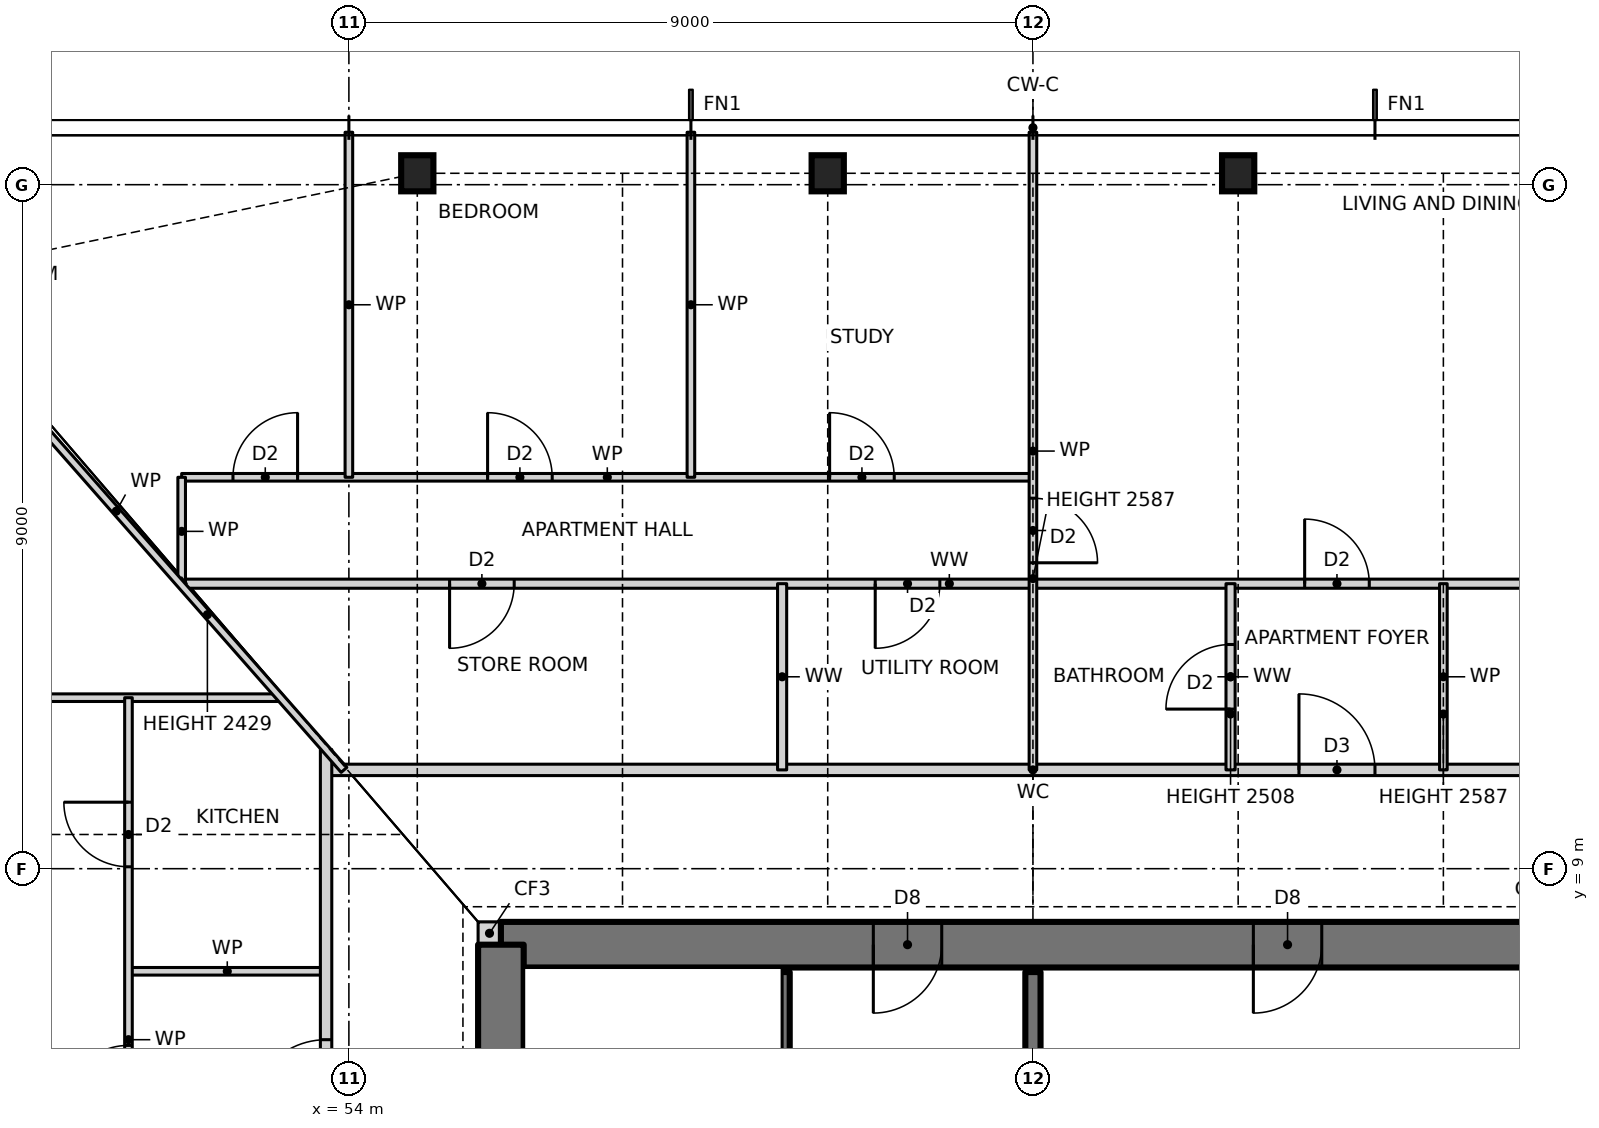
"""IFC4 building model, lengths in metres.
Left out: names, types, materials, properties, quantities, classifications, styles, units other than length and angle.
Written with IfcOpenShell. Run it as: python <this file> out.ifc"""

import sys

from ifc_helpers import new_model, si_unit, direction, frame, frame_2d, origin, origin_2d, place, context, subcontext, project, spatial, rectangle, i_section, extrude, element, fill, save


model = new_model("IFC4")
c1 = context("Model", 3, precision=1e-05, world=origin(), true_north=direction((0.0, 1.0)))
c2 = subcontext(c1, "Body", "Model", "MODEL_VIEW")
j1 = project(units=[si_unit("LENGTHUNIT", "METRE"), si_unit("PLANEANGLEUNIT", "RADIAN")], contexts=[c1])
p1 = place(None, origin())
s1 = spatial("IfcSite", under=j1, at=p1, CompositionType="ELEMENT")
p2 = place(p1, origin())
s2 = spatial("IfcBuilding", under=s1, at=p2, CompositionType="ELEMENT")
p3 = place(p2, frame((0.0, 0.0, 60.5)))
s3 = spatial("IfcBuildingStorey", under=s2, at=p3, CompositionType="ELEMENT", Elevation=60.5)
for number, where, z_axis, x_axis in (
    (1, (65.7, 18.15, 0.0), (0.0, 0.0, 1.0), (1.0, 0.0, 0.0)),
    (2, (60.3, 18.15, 0.0), (0.0, 0.0, 1.0), (1.0, 0.0, 0.0)),
    (3, (54.9, 18.15, 0.0), (0.0, 0.0, 1.0), (1.0, 0.0, 0.0)),
):
    element("IfcColumn", number, at=place(p3, frame(where, z_axis=z_axis, x_axis=x_axis)), inside=s3, PredefinedType="COLUMN", context=c2, shape_type="SweptSolid", body=[
        extrude(i_section(OverallWidth=0.424, OverallDepth=0.475, WebThickness=0.048, FlangeThickness=0.077, at=origin_2d()), origin(), (0.0, 0.0, 1.0), 3.5),
    ])
p4 = place(p3, frame((55.7, 8.15, 0.0), z_axis=(0.0, 0.0, 1.0), x_axis=(1.0, 0.0, 0.0)))
e4 = element("IfcWall", 4, at=p4, inside=s3, PredefinedType="SOLIDWALL", context=c2, shape_type="SweptSolid", body=[
    extrude(rectangle(XDim=0.3, YDim=0.3, at=frame_2d((0.15, 0.0))), origin(), (0.0, 0.0, 1.0), 3.5),
])
p5 = place(p3, frame((70.0, 8.0, 0.0), z_axis=(0.0, 0.0, 1.0), x_axis=(-1.0, 0.0, 0.0)))
e5 = element("IfcWall", 5, at=p5, inside=s3, PredefinedType="SHEAR", context=c2, shape_type="SweptSolid", body=[
    extrude(rectangle(XDim=14.0, YDim=0.6, at=frame_2d((7.0, 0.0))), origin(), (0.0, 0.0, 1.0), 3.5),
])
p6 = place(p5, frame((8.2, 0.0, 0.0)))
e6 = element("IfcOpeningElement", 6, at=p6, cuts=e5, PredefinedType="OPENING", context=c2, shape_type="SweptSolid", body=[
    extrude(rectangle(XDim=0.9, YDim=2.1, at=frame_2d((0.45, 1.05))), frame((0.0, 0.31, 0.0), z_axis=(0.0, -1.0, 0.0), x_axis=(1.0, 0.0, 0.0)), (0.0, 0.0, 1.0), 0.62),
])
p7 = place(p5, frame((3.2, 0.0, 0.0)))
e7 = element("IfcOpeningElement", 7, at=p7, cuts=e5, PredefinedType="OPENING", context=c2, shape_type="SweptSolid", body=[
    extrude(rectangle(XDim=0.9, YDim=2.1, at=frame_2d((0.45, 1.05))), frame((0.0, 0.31, 0.0), z_axis=(0.0, -1.0, 0.0), x_axis=(1.0, 0.0, 0.0)), (0.0, 0.0, 1.0), 0.62),
])
p8 = place(p3, frame((56.0, 8.0, 0.0), z_axis=(0.0, 0.0, 1.0), x_axis=(0.0, -1.0, 0.0)))
e8 = element("IfcWall", 8, at=p8, inside=s3, PredefinedType="SHEAR", context=c2, shape_type="SweptSolid", body=[
    extrude(rectangle(XDim=16.0, YDim=0.6, at=frame_2d((8.0, 0.0))), origin(), (0.0, 0.0, 1.0), 3.5),
])
p9 = place(p8, frame((7.5, 0.0, 0.0)))
e9 = element("IfcOpeningElement", 9, at=p9, cuts=e8, PredefinedType="OPENING", context=c2, shape_type="SweptSolid", body=[
    extrude(rectangle(XDim=1.0, YDim=2.1, at=frame_2d((0.5, 1.05))), frame((0.0, 0.31, 0.0), z_axis=(0.0, -1.0, 0.0), x_axis=(1.0, 0.0, 0.0)), (0.0, 0.0, 1.0), 0.62),
])
p10 = place(p3, frame((51.1, 7.65, 0.0), z_axis=(0.0, 0.0, 1.0), x_axis=(1.0, 0.0, 0.0)))
e10 = element("IfcWall", 10, at=p10, inside=s3, PredefinedType="PARTITIONING", context=c2, shape_type="SweptSolid", body=[
    extrude(rectangle(XDim=2.6, YDim=0.1, at=frame_2d((1.3, 0.0))), origin(), (0.0, 0.0, 1.0), 3.27),
])
p11 = place(p3, frame((53.7, 10.3, 0.0), z_axis=(0.0, 0.0, 1.0), x_axis=(1.0, 0.0, 0.0)))
e11 = element("IfcWall", 11, at=p11, inside=s3, PredefinedType="PARTITIONING", context=c2, shape_type="SweptSolid", body=[
    extrude(rectangle(XDim=18.6, YDim=0.15, at=frame_2d((9.3, 0.0))), origin(), (0.0, 0.0, 1.0), 3.27),
])
p12 = place(p11, frame((12.8, 0.0, 0.0)))
e12 = element("IfcOpeningElement", 12, at=p12, cuts=e11, PredefinedType="OPENING", context=c2, shape_type="SweptSolid", body=[
    extrude(rectangle(XDim=1.0, YDim=2.1, at=frame_2d((0.5, 1.05))), frame((0.0, 0.085, 0.0), z_axis=(0.0, -1.0, 0.0), x_axis=(1.0, 0.0, 0.0)), (0.0, 0.0, 1.0), 0.17),
])
p13 = place(p3, frame((46.56, 11.25, 0.0), z_axis=(0.0, 0.0, 1.0), x_axis=(1.0, 0.0, 0.0)))
e13 = element("IfcWall", 13, at=p13, inside=s3, PredefinedType="PARTITIONING", context=c2, shape_type="SweptSolid", body=[
    extrude(rectangle(XDim=6.54, YDim=0.1, at=frame_2d((3.27, 0.0))), origin(), (0.0, 0.0, 1.0), 3.27),
])
p14 = place(p13, frame((1.845, 0.0, 0.0)))
e14 = element("IfcOpeningElement", 14, at=p14, cuts=e13, PredefinedType="OPENING", context=c2, shape_type="SweptSolid", body=[
    extrude(rectangle(XDim=0.85, YDim=2.1, at=frame_2d((0.425, 1.05))), frame((0.0, 0.06, 0.0), z_axis=(0.0, -1.0, 0.0), x_axis=(1.0, 0.0, 0.0)), (0.0, 0.0, 1.0), 0.12),
])
p15 = place(p3, frame((51.8, 12.75, 0.0), z_axis=(0.0, 0.0, 1.0), x_axis=(1.0, 0.0, 0.0)))
e15 = element("IfcWall", 15, at=p15, inside=s3, PredefinedType="PARTITIONING", context=c2, shape_type="SweptSolid", body=[
    extrude(rectangle(XDim=20.2, YDim=0.12, at=frame_2d((10.1, 0.0))), origin(), (0.0, 0.0, 1.0), 3.27),
])
p16 = place(p15, frame((17.975, 0.0, 0.0)))
e16 = element("IfcOpeningElement", 16, at=p16, cuts=e15, PredefinedType="OPENING", context=c2, shape_type="SweptSolid", body=[
    extrude(rectangle(XDim=0.85, YDim=2.1, at=frame_2d((0.425, 1.05))), frame((0.0, 0.07, 0.0), z_axis=(0.0, -1.0, 0.0), x_axis=(1.0, 0.0, 0.0)), (0.0, 0.0, 1.0), 0.14),
])
p17 = place(p15, frame((14.775, 0.0, 0.0)))
e17 = element("IfcOpeningElement", 17, at=p17, cuts=e15, PredefinedType="OPENING", context=c2, shape_type="SweptSolid", body=[
    extrude(rectangle(XDim=0.85, YDim=2.1, at=frame_2d((0.425, 1.05))), frame((0.0, 0.07, 0.0), z_axis=(0.0, -1.0, 0.0), x_axis=(1.0, 0.0, 0.0)), (0.0, 0.0, 1.0), 0.14),
])
p18 = place(p15, frame((9.125, 0.0, 0.0)))
e18 = element("IfcOpeningElement", 18, at=p18, cuts=e15, PredefinedType="OPENING", context=c2, shape_type="SweptSolid", body=[
    extrude(rectangle(XDim=0.85, YDim=2.1, at=frame_2d((0.425, 1.05))), frame((0.0, 0.07, 0.0), z_axis=(0.0, -1.0, 0.0), x_axis=(1.0, 0.0, 0.0)), (0.0, 0.0, 1.0), 0.14),
])
p19 = place(p15, frame((3.525, 0.0, 0.0)))
e19 = element("IfcOpeningElement", 19, at=p19, cuts=e15, PredefinedType="OPENING", context=c2, shape_type="SweptSolid", body=[
    extrude(rectangle(XDim=0.85, YDim=2.1, at=frame_2d((0.425, 1.05))), frame((0.0, 0.07, 0.0), z_axis=(0.0, -1.0, 0.0), x_axis=(1.0, 0.0, 0.0)), (0.0, 0.0, 1.0), 0.14),
])
p20 = place(p3, frame((51.8, 14.15, 0.0), z_axis=(0.0, 0.0, 1.0), x_axis=(1.0, 0.0, 0.0)))
e20 = element("IfcWall", 20, at=p20, inside=s3, PredefinedType="PARTITIONING", context=c2, shape_type="SweptSolid", body=[
    extrude(rectangle(XDim=11.2, YDim=0.1, at=frame_2d((5.6, 0.0))), origin(), (0.0, 0.0, 1.0), 3.27),
])
p21 = place(p20, frame((8.525, 0.0, 0.0)))
e21 = element("IfcOpeningElement", 21, at=p21, cuts=e20, PredefinedType="OPENING", context=c2, shape_type="SweptSolid", body=[
    extrude(rectangle(XDim=0.85, YDim=2.1, at=frame_2d((0.425, 1.05))), frame((0.0, 0.06, 0.0), z_axis=(0.0, -1.0, 0.0), x_axis=(1.0, 0.0, 0.0)), (0.0, 0.0, 1.0), 0.12),
])
p22 = place(p20, frame((4.025, 0.0, 0.0)))
e22 = element("IfcOpeningElement", 22, at=p22, cuts=e20, PredefinedType="OPENING", context=c2, shape_type="SweptSolid", body=[
    extrude(rectangle(XDim=0.85, YDim=2.1, at=frame_2d((0.425, 1.05))), frame((0.0, 0.06, 0.0), z_axis=(0.0, -1.0, 0.0), x_axis=(1.0, 0.0, 0.0)), (0.0, 0.0, 1.0), 0.12),
])
p23 = place(p20, frame((0.675, 0.0, 0.0)))
e23 = element("IfcOpeningElement", 23, at=p23, cuts=e20, PredefinedType="OPENING", context=c2, shape_type="SweptSolid", body=[
    extrude(rectangle(XDim=0.85, YDim=2.1, at=frame_2d((0.425, 1.05))), frame((0.0, 0.06, 0.0), z_axis=(0.0, -1.0, 0.0), x_axis=(1.0, 0.0, 0.0)), (0.0, 0.0, 1.0), 0.12),
])
p24 = place(p3, frame((68.4, 10.3, 0.0), z_axis=(0.0, 0.0, 1.0), x_axis=(0.0, 1.0, 0.0)))
e24 = element("IfcWall", 24, at=p24, inside=s3, PredefinedType="PARTITIONING", context=c2, shape_type="SweptSolid", body=[
    extrude(rectangle(XDim=2.45, YDim=0.1, at=frame_2d((1.225, 0.0))), origin(), (0.0, 0.0, 1.0), 2.587),
])
p25 = place(p3, frame((65.6, 10.3, 0.0), z_axis=(0.0, 0.0, 1.0), x_axis=(0.0, 1.0, 0.0)))
e25 = element("IfcWall", 25, at=p25, inside=s3, PredefinedType="PARTITIONING", context=c2, shape_type="SweptSolid", body=[
    extrude(rectangle(XDim=2.45, YDim=0.12, at=frame_2d((1.225, 0.0))), origin(), (0.0, 0.0, 1.0), 2.508),
])
p26 = place(p25, frame((0.8, 0.0, 0.0)))
e26 = element("IfcOpeningElement", 26, at=p26, cuts=e25, PredefinedType="OPENING", context=c2, shape_type="SweptSolid", body=[
    extrude(rectangle(XDim=0.85, YDim=2.1, at=frame_2d((0.425, 1.05))), frame((0.0, 0.07, 0.0), z_axis=(0.0, -1.0, 0.0), x_axis=(1.0, 0.0, 0.0)), (0.0, 0.0, 1.0), 0.14),
])
p27 = place(p3, frame((63.0, 3.85, 0.0), z_axis=(0.0, 0.0, 1.0), x_axis=(0.0, 1.0, 0.0)))
e27 = element("IfcWall", 27, at=p27, inside=s3, PredefinedType="SOLIDWALL", context=c2, shape_type="SweptSolid", body=[
    extrude(rectangle(XDim=3.79, YDim=0.2, at=frame_2d((1.895, 0.0))), origin(), (0.0, 0.0, 1.0), 3.5),
])
p28 = place(p3, frame((63.0, 10.3, 0.0), z_axis=(0.0, 0.0, 1.0), x_axis=(0.0, 1.0, 0.0)))
e28 = element("IfcWall", 28, at=p28, inside=s3, PredefinedType="PARTITIONING", context=c2, shape_type="SweptSolid", body=[
    extrude(rectangle(XDim=8.39, YDim=0.1, at=frame_2d((4.195, 0.0))), origin(), (0.0, 0.0, 1.0), 2.587),
])
p29 = place(p28, frame((2.725, 0.0, 0.0)))
e29 = element("IfcOpeningElement", 29, at=p29, cuts=e28, PredefinedType="OPENING", context=c2, shape_type="SweptSolid", body=[
    extrude(rectangle(XDim=0.85, YDim=2.1, at=frame_2d((0.425, 1.05))), frame((0.0, 0.06, 0.0), z_axis=(0.0, -1.0, 0.0), x_axis=(1.0, 0.0, 0.0)), (0.0, 0.0, 1.0), 0.12),
])
p30 = place(p3, frame((59.7, 1.05, 0.0), z_axis=(0.0, 0.0, 1.0), x_axis=(0.0, 1.0, 0.0)))
e30 = element("IfcWall", 30, at=p30, inside=s3, PredefinedType="SOLIDWALL", context=c2, shape_type="SweptSolid", body=[
    extrude(rectangle(XDim=6.59, YDim=0.2, at=frame_2d((3.295, 0.0))), origin(), (0.0, 0.0, 1.0), 3.5),
])
p31 = place(p3, frame((59.7, 10.3, 0.0), z_axis=(0.0, 0.0, 1.0), x_axis=(0.0, 1.0, 0.0)))
e31 = element("IfcWall", 31, at=p31, inside=s3, PredefinedType="PARTITIONING", context=c2, shape_type="SweptSolid", body=[
    extrude(rectangle(XDim=2.45, YDim=0.12, at=frame_2d((1.225, 0.0))), origin(), (0.0, 0.0, 1.0), 3.27),
])
for number, where, z_axis, x_axis in (
    (32, (58.5, 14.15, 0.0), (0.0, 0.0, 1.0), (0.0, 1.0, 0.0)),
    (33, (54.0, 14.15, 0.0), (0.0, 0.0, 1.0), (0.0, 1.0, 0.0)),
):
    element("IfcWall", number, at=place(p3, frame(where, z_axis=z_axis, x_axis=x_axis)), inside=s3, PredefinedType="PARTITIONING", context=c2, shape_type="SweptSolid", body=[
        extrude(rectangle(XDim=4.54, YDim=0.1, at=frame_2d((2.27, 0.0))), origin(), (0.0, 0.0, 1.0), 3.27),
    ])
p32 = place(p3, frame((53.7, -10.9, 0.0), z_axis=(0.0, 0.0, 1.0), x_axis=(0.0, 1.0, 0.0)))
e34 = element("IfcWall", 34, at=p32, inside=s3, PredefinedType="PARTITIONING", context=c2, shape_type="SweptSolid", body=[
    extrude(rectangle(XDim=21.468, YDim=0.15, at=frame_2d((10.734, 0.0))), origin(), (0.0, 0.0, 1.0), 3.27),
])
p33 = place(p32, frame((16.65, 0.0, 0.0)))
e35 = element("IfcOpeningElement", 35, at=p33, cuts=e34, PredefinedType="OPENING", context=c2, shape_type="SweptSolid", body=[
    extrude(rectangle(XDim=1.0, YDim=2.1, at=frame_2d((0.5, 1.05))), frame((0.0, 0.085, 0.0), z_axis=(0.0, -1.0, 0.0), x_axis=(1.0, 0.0, 0.0)), (0.0, 0.0, 1.0), 0.17),
])
p34 = place(p32, frame((11.25, 0.0, 0.0)))
e36 = element("IfcOpeningElement", 36, at=p34, cuts=e34, PredefinedType="OPENING", context=c2, shape_type="SweptSolid", body=[
    extrude(rectangle(XDim=1.0, YDim=2.1, at=frame_2d((0.5, 1.05))), frame((0.0, 0.085, 0.0), z_axis=(0.0, -1.0, 0.0), x_axis=(1.0, 0.0, 0.0)), (0.0, 0.0, 1.0), 0.17),
])
p35 = place(p3, frame((51.8, 12.727, 0.0), z_axis=(0.0, 0.0, 1.0), x_axis=(0.0, 1.0, 0.0)))
e37 = element("IfcWall", 37, at=p35, inside=s3, PredefinedType="PARTITIONING", context=c2, shape_type="SweptSolid", body=[
    extrude(rectangle(XDim=1.423, YDim=0.1, at=frame_2d((0.711, 0.0))), origin(), (0.0, 0.0, 1.0), 3.27),
])
p36 = place(p3, frame((51.1, 2.25, 0.0), z_axis=(0.0, 0.0, 1.0), x_axis=(0.0, 1.0, 0.0)))
e38 = element("IfcWall", 38, at=p36, inside=s3, PredefinedType="PARTITIONING", context=c2, shape_type="SweptSolid", body=[
    extrude(rectangle(XDim=9.0, YDim=0.1, at=frame_2d((4.5, 0.0))), origin(), (0.0, 0.0, 1.0), 3.27),
])
p37 = place(p36, frame((6.775, 0.0, 0.0)))
e39 = element("IfcOpeningElement", 39, at=p37, cuts=e38, PredefinedType="OPENING", context=c2, shape_type="SweptSolid", body=[
    extrude(rectangle(XDim=0.85, YDim=2.1, at=frame_2d((0.425, 1.05))), frame((0.0, 0.06, 0.0), z_axis=(0.0, -1.0, 0.0), x_axis=(1.0, 0.0, 0.0)), (0.0, 0.0, 1.0), 0.12),
])
p38 = place(p36, frame((3.575, 0.0, 0.0)))
e40 = element("IfcOpeningElement", 40, at=p38, cuts=e38, PredefinedType="OPENING", context=c2, shape_type="SweptSolid", body=[
    extrude(rectangle(XDim=0.85, YDim=2.1, at=frame_2d((0.425, 1.05))), frame((0.0, 0.06, 0.0), z_axis=(0.0, -1.0, 0.0), x_axis=(1.0, 0.0, 0.0)), (0.0, 0.0, 1.0), 0.12),
])
p39 = place(p3, frame((53.936, 10.3, 0.0), z_axis=(0.0, 0.0, 1.0), x_axis=(-0.660638210404, 0.750704439146, 0.0)))
e41 = element("IfcWall", 41, at=p39, inside=s3, PredefinedType="PARTITIONING", context=c2, shape_type="SweptSolid", body=[
    extrude(rectangle(XDim=9.07, YDim=0.1, at=frame_2d((4.535, 0.0))), origin(), (0.0, 0.0, 1.0), 2.429),
])
p40 = place(p12, origin())
e42 = element("IfcDoor", 42, at=p40, inside=s3, OperationType="SINGLE_SWING_LEFT", PredefinedType="DOOR", context=c2, shape_type="SweptSolid", body=[
    extrude(rectangle(XDim=1.0, YDim=2.1, at=frame_2d((0.5, 1.05))), frame((0.0, 0.025, 0.0), z_axis=(0.0, -1.0, 0.0), x_axis=(1.0, 0.0, 0.0)), (0.0, 0.0, 1.0), 0.05),
])
fill(e12, e42)
p41 = place(p17, origin())
e43 = element("IfcDoor", 43, at=p41, inside=s3, OperationType="SINGLE_SWING_LEFT", PredefinedType="DOOR", context=c2, shape_type="SweptSolid", body=[
    extrude(rectangle(XDim=0.85, YDim=2.1, at=frame_2d((0.425, 1.05))), frame((0.0, 0.025, 0.0), z_axis=(0.0, -1.0, 0.0), x_axis=(1.0, 0.0, 0.0)), (0.0, 0.0, 1.0), 0.05),
])
fill(e17, e43)
p42 = place(p26, origin())
e44 = element("IfcDoor", 44, at=p42, inside=s3, OperationType="SINGLE_SWING_LEFT", PredefinedType="DOOR", context=c2, shape_type="SweptSolid", body=[
    extrude(rectangle(XDim=0.85, YDim=2.1, at=frame_2d((0.425, 1.05))), frame((0.0, 0.025, 0.0), z_axis=(0.0, -1.0, 0.0), x_axis=(1.0, 0.0, 0.0)), (0.0, 0.0, 1.0), 0.05),
])
fill(e26, e44)
p43 = place(p29, frame((0.85, 0.0, 0.0), z_axis=(0.0, 0.0, 1.0), x_axis=(-1.0, 0.0, 0.0)))
e45 = element("IfcDoor", 45, at=p43, inside=s3, OperationType="SINGLE_SWING_RIGHT", PredefinedType="DOOR", context=c2, shape_type="SweptSolid", body=[
    extrude(rectangle(XDim=0.85, YDim=2.1, at=frame_2d((0.425, 1.05))), frame((0.0, 0.025, 0.0), z_axis=(0.0, -1.0, 0.0), x_axis=(1.0, 0.0, 0.0)), (0.0, 0.0, 1.0), 0.05),
])
fill(e29, e45)
p44 = place(p21, origin())
e46 = element("IfcDoor", 46, at=p44, inside=s3, OperationType="SINGLE_SWING_LEFT", PredefinedType="DOOR", context=c2, shape_type="SweptSolid", body=[
    extrude(rectangle(XDim=0.85, YDim=2.1, at=frame_2d((0.425, 1.05))), frame((0.0, 0.025, 0.0), z_axis=(0.0, -1.0, 0.0), x_axis=(1.0, 0.0, 0.0)), (0.0, 0.0, 1.0), 0.05),
])
fill(e21, e46)
p45 = place(p22, origin())
e47 = element("IfcDoor", 47, at=p45, inside=s3, OperationType="SINGLE_SWING_LEFT", PredefinedType="DOOR", context=c2, shape_type="SweptSolid", body=[
    extrude(rectangle(XDim=0.85, YDim=2.1, at=frame_2d((0.425, 1.05))), frame((0.0, 0.025, 0.0), z_axis=(0.0, -1.0, 0.0), x_axis=(1.0, 0.0, 0.0)), (0.0, 0.0, 1.0), 0.05),
])
fill(e22, e47)
p46 = place(p23, origin())
e48 = element("IfcDoor", 48, at=p46, inside=s3, OperationType="SINGLE_SWING_RIGHT", PredefinedType="DOOR", context=c2, shape_type="SweptSolid", body=[
    extrude(rectangle(XDim=0.85, YDim=2.1, at=frame_2d((0.425, 1.05))), frame((0.0, 0.025, 0.0), z_axis=(0.0, -1.0, 0.0), x_axis=(1.0, 0.0, 0.0)), (0.0, 0.0, 1.0), 0.05),
])
fill(e23, e48)
p47 = place(p18, frame((0.85, 0.0, 0.0), z_axis=(0.0, 0.0, 1.0), x_axis=(-1.0, 0.0, 0.0)))
e49 = element("IfcDoor", 49, at=p47, inside=s3, OperationType="SINGLE_SWING_RIGHT", PredefinedType="DOOR", context=c2, shape_type="SweptSolid", body=[
    extrude(rectangle(XDim=0.85, YDim=2.1, at=frame_2d((0.425, 1.05))), frame((0.0, 0.025, 0.0), z_axis=(0.0, -1.0, 0.0), x_axis=(1.0, 0.0, 0.0)), (0.0, 0.0, 1.0), 0.05),
])
fill(e18, e49)
p48 = place(p19, frame((0.85, 0.0, 0.0), z_axis=(0.0, 0.0, 1.0), x_axis=(-1.0, 0.0, 0.0)))
e50 = element("IfcDoor", 50, at=p48, inside=s3, OperationType="SINGLE_SWING_RIGHT", PredefinedType="DOOR", context=c2, shape_type="SweptSolid", body=[
    extrude(rectangle(XDim=0.85, YDim=2.1, at=frame_2d((0.425, 1.05))), frame((0.0, 0.025, 0.0), z_axis=(0.0, -1.0, 0.0), x_axis=(1.0, 0.0, 0.0)), (0.0, 0.0, 1.0), 0.05),
])
fill(e19, e50)
p49 = place(p37, origin())
e51 = element("IfcDoor", 51, at=p49, inside=s3, OperationType="SINGLE_SWING_RIGHT", PredefinedType="DOOR", context=c2, shape_type="SweptSolid", body=[
    extrude(rectangle(XDim=0.85, YDim=2.1, at=frame_2d((0.425, 1.05))), frame((0.0, 0.025, 0.0), z_axis=(0.0, -1.0, 0.0), x_axis=(1.0, 0.0, 0.0)), (0.0, 0.0, 1.0), 0.05),
])
fill(e39, e51)
p50 = place(p33, origin())
e52 = element("IfcDoor", 52, at=p50, inside=s3, OperationType="SINGLE_SWING_LEFT", PredefinedType="DOOR", context=c2, shape_type="SweptSolid", body=[
    extrude(rectangle(XDim=1.0, YDim=2.1, at=frame_2d((0.5, 1.05))), frame((0.0, 0.025, 0.0), z_axis=(0.0, -1.0, 0.0), x_axis=(1.0, 0.0, 0.0)), (0.0, 0.0, 1.0), 0.05),
])
fill(e35, e52)
p51 = place(p38, origin())
e53 = element("IfcDoor", 53, at=p51, inside=s3, OperationType="SINGLE_SWING_LEFT", PredefinedType="DOOR", context=c2, shape_type="SweptSolid", body=[
    extrude(rectangle(XDim=0.85, YDim=2.1, at=frame_2d((0.425, 1.05))), frame((0.0, 0.025, 0.0), z_axis=(0.0, -1.0, 0.0), x_axis=(1.0, 0.0, 0.0)), (0.0, 0.0, 1.0), 0.05),
])
fill(e40, e53)
p52 = place(p6, origin())
e54 = element("IfcDoor", 54, at=p52, inside=s3, OperationType="SINGLE_SWING_RIGHT", PredefinedType="DOOR", context=c2, shape_type="SweptSolid", body=[
    extrude(rectangle(XDim=0.9, YDim=2.1, at=frame_2d((0.45, 1.05))), frame((0.0, 0.025, 0.0), z_axis=(0.0, -1.0, 0.0), x_axis=(1.0, 0.0, 0.0)), (0.0, 0.0, 1.0), 0.05),
])
fill(e6, e54)
p53 = place(p7, origin())
e55 = element("IfcDoor", 55, at=p53, inside=s3, OperationType="SINGLE_SWING_RIGHT", PredefinedType="DOOR", context=c2, shape_type="SweptSolid", body=[
    extrude(rectangle(XDim=0.9, YDim=2.1, at=frame_2d((0.45, 1.05))), frame((0.0, 0.025, 0.0), z_axis=(0.0, -1.0, 0.0), x_axis=(1.0, 0.0, 0.0)), (0.0, 0.0, 1.0), 0.05),
])
fill(e7, e55)
save(model, sys.argv[1])
